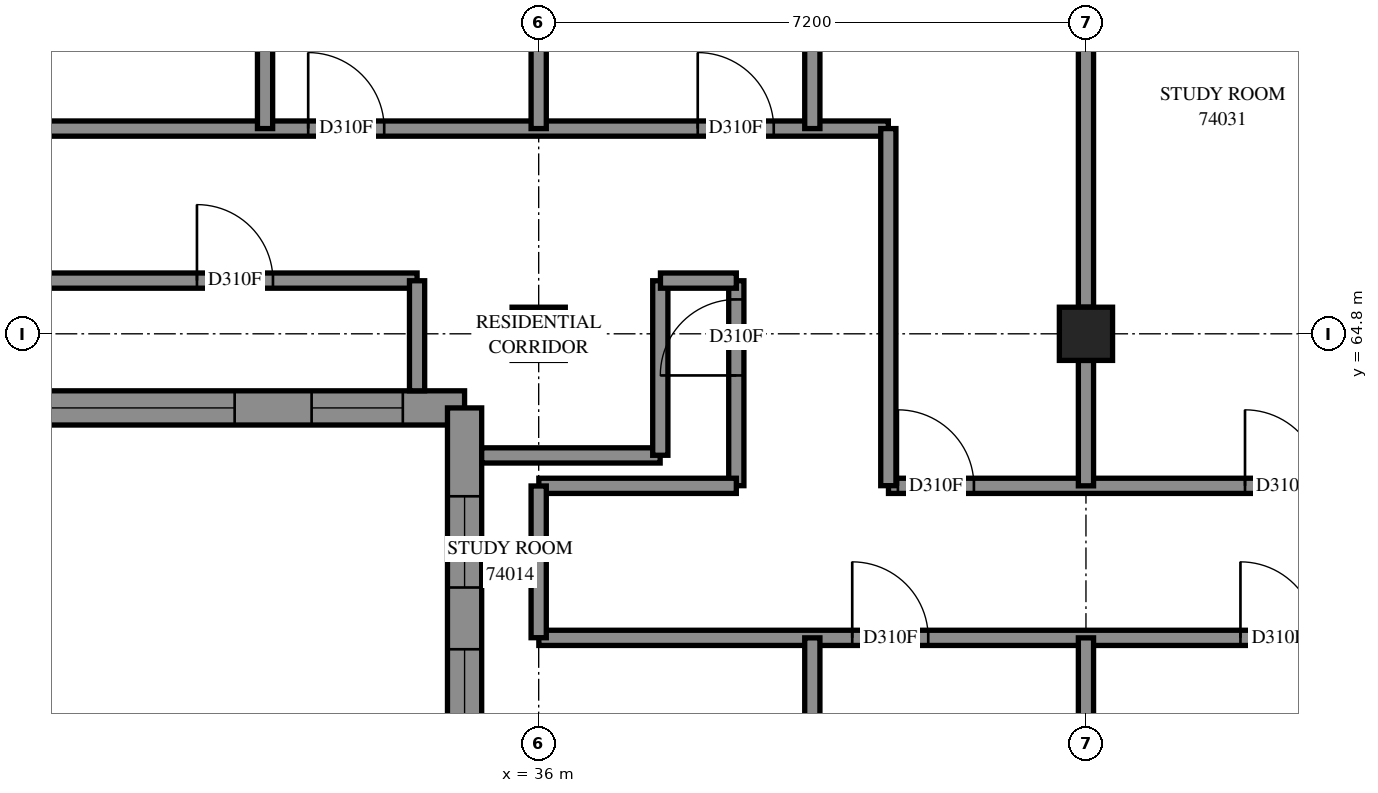
"""IFC4 building model, lengths in metres.
Left out: names, types, materials, properties, quantities, classifications, styles, units other than length and angle.
Written with IfcOpenShell. Run it as: python <this file> out.ifc"""

import sys

from ifc_helpers import new_model, si_unit, direction, frame, frame_2d, origin, origin_2d, place, context, subcontext, project, spatial, polyline, rectangle, outline, extrude, element, fill, save


model = new_model("IFC4")
c1 = context("Model", 3, precision=1e-05, world=origin(), true_north=direction((0.0, 1.0)))
c2 = subcontext(c1, "Body", "Model", "MODEL_VIEW")
j1 = project(units=[si_unit("LENGTHUNIT", "METRE"), si_unit("PLANEANGLEUNIT", "RADIAN")], contexts=[c1])
p1 = place(None, origin())
s1 = spatial("IfcSite", under=j1, at=p1, CompositionType="ELEMENT")
p2 = place(p1, origin())
s2 = spatial("IfcBuilding", under=s1, at=p2, CompositionType="ELEMENT")
p3 = place(p2, frame((0.0, 0.0, 271.0)))
s3 = spatial("IfcBuildingStorey", under=s2, at=p3, CompositionType="ELEMENT", Elevation=271.0)
for number, where, z_axis, x_axis in (
    (1, (36.0, 64.8, 0.0), (0.0, 0.0, 1.0), (1.0, 0.0, 0.0)),
    (2, (43.2, 64.8, 0.0), (0.0, 0.0, 1.0), (1.0, 0.0, 0.0)),
):
    element("IfcColumn", number, at=place(p3, frame(where, z_axis=z_axis, x_axis=x_axis)), inside=s3, PredefinedType="COLUMN", context=c2, shape_type="SweptSolid", body=[
        extrude(rectangle(XDim=0.7, YDim=0.7, at=origin_2d()), origin(), (0.0, 0.0, 1.0), 3.1),
    ])
p4 = place(p3, frame((26.683, 63.825, 0.0), z_axis=(0.0, 0.0, 1.0), x_axis=(1.0, 0.0, 0.0)))
e3 = element("IfcWall", 3, at=p4, inside=s3, PredefinedType="SOLIDWALL", context=c2, shape_type="SweptSolid", body=[
    extrude(outline(polyline([(-0.225, -0.225), (8.117, -0.225), (8.567, 0.225), (0.225, 0.225), (-0.225, -0.225)])), origin(), (0.0, 0.0, 1.0), 3.1),
])
p5 = place(p4, frame((2.517, 0.0, 0.45)))
e4 = element("IfcOpeningElement", 4, at=p5, cuts=e3, PredefinedType="OPENING", context=c2, shape_type="SweptSolid", body=[
    extrude(rectangle(XDim=2.8, YDim=2.55, at=frame_2d((1.4, 1.275))), frame((0.0, 0.235, 0.0), z_axis=(0.0, -1.0, 0.0), x_axis=(1.0, 0.0, 0.0)), (0.0, 0.0, 1.0), 0.47),
])
p6 = place(p4, frame((0.671, 0.0, 0.45)))
e5 = element("IfcOpeningElement", 5, at=p6, cuts=e3, PredefinedType="OPENING", context=c2, shape_type="SweptSolid", body=[
    extrude(rectangle(XDim=1.2, YDim=2.55, at=frame_2d((0.6, 1.275))), frame((0.0, 0.235, 0.0), z_axis=(0.0, -1.0, 0.0), x_axis=(1.0, 0.0, 0.0)), (0.0, 0.0, 1.0), 0.47),
])
p7 = place(p4, frame((6.33, 0.0, 0.45)))
e6 = element("IfcOpeningElement", 6, at=p7, cuts=e3, PredefinedType="OPENING", context=c2, shape_type="SweptSolid", body=[
    extrude(rectangle(XDim=1.2, YDim=2.55, at=frame_2d((0.6, 1.275))), frame((0.0, 0.235, 0.0), z_axis=(0.0, -1.0, 0.0), x_axis=(1.0, 0.0, 0.0)), (0.0, 0.0, 1.0), 0.47),
])
p8 = place(p3, frame((35.025, 63.825, 0.0), z_axis=(0.0, 0.0, 1.0), x_axis=(0.0, -1.0, 0.0)))
e7 = element("IfcWall", 7, at=p8, inside=s3, PredefinedType="SOLIDWALL", context=c2, shape_type="SweptSolid", body=[
    extrude(outline(polyline([(0.225, -0.225), (7.425, -0.225), (6.975, 0.225), (-0.225, 0.225), (0.225, -0.225)])), origin(), (0.0, 0.0, 1.0), 3.1),
])
p9 = place(p8, frame((3.175, 0.0, 0.45)))
e8 = element("IfcOpeningElement", 8, at=p9, cuts=e7, PredefinedType="OPENING", context=c2, shape_type="SweptSolid", body=[
    extrude(rectangle(XDim=2.8, YDim=2.55, at=frame_2d((1.4, 1.275))), frame((0.0, 0.235, 0.0), z_axis=(0.0, -1.0, 0.0), x_axis=(1.0, 0.0, 0.0)), (0.0, 0.0, 1.0), 0.47),
])
p10 = place(p8, frame((1.163, 0.0, 0.45)))
e9 = element("IfcOpeningElement", 9, at=p10, cuts=e7, PredefinedType="OPENING", context=c2, shape_type="SweptSolid", body=[
    extrude(rectangle(XDim=1.2, YDim=2.55, at=frame_2d((0.6, 1.275))), frame((0.0, 0.235, 0.0), z_axis=(0.0, -1.0, 0.0), x_axis=(1.0, 0.0, 0.0)), (0.0, 0.0, 1.0), 0.47),
])
p11 = place(p3, frame((36.002, 60.8, 0.0), z_axis=(0.0, 0.0, 1.0), x_axis=(1.0, 0.0, 0.0)))
e10 = element("IfcWall", 10, at=p11, inside=s3, PredefinedType="PARTITIONING", context=c2, shape_type="SweptSolid", body=[
    extrude(rectangle(XDim=16.998, YDim=0.2, at=frame_2d((8.499, 0.0))), origin(), (0.0, 0.0, 1.0), 3.1),
])
p12 = place(p11, frame((4.123, 0.0, 0.0)))
e11 = element("IfcOpeningElement", 11, at=p12, cuts=e10, PredefinedType="OPENING", context=c2, shape_type="SweptSolid", body=[
    extrude(rectangle(XDim=1.0, YDim=2.1, at=frame_2d((0.5, 1.05))), frame((0.0, 0.11, 0.0), z_axis=(0.0, -1.0, 0.0), x_axis=(1.0, 0.0, 0.0)), (0.0, 0.0, 1.0), 0.22),
])
p13 = place(p11, frame((9.23, 0.0, 0.0)))
e12 = element("IfcOpeningElement", 12, at=p13, cuts=e10, PredefinedType="OPENING", context=c2, shape_type="SweptSolid", body=[
    extrude(rectangle(XDim=1.0, YDim=2.1, at=frame_2d((0.5, 1.05))), frame((0.0, 0.11, 0.0), z_axis=(0.0, -1.0, 0.0), x_axis=(1.0, 0.0, 0.0)), (0.0, 0.0, 1.0), 0.22),
])
p14 = place(p11, frame((11.306, 0.0, 0.0)))
e13 = element("IfcOpeningElement", 13, at=p14, cuts=e10, PredefinedType="OPENING", context=c2, shape_type="SweptSolid", body=[
    extrude(rectangle(XDim=1.0, YDim=2.1, at=frame_2d((0.5, 1.05))), frame((0.0, 0.11, 0.0), z_axis=(0.0, -1.0, 0.0), x_axis=(1.0, 0.0, 0.0)), (0.0, 0.0, 1.0), 0.22),
])
p15 = place(p11, frame((15.872, 0.0, 0.0)))
e14 = element("IfcOpeningElement", 14, at=p15, cuts=e10, PredefinedType="OPENING", context=c2, shape_type="SweptSolid", body=[
    extrude(rectangle(XDim=1.0, YDim=2.1, at=frame_2d((0.5, 1.05))), frame((0.0, 0.11, 0.0), z_axis=(0.0, -1.0, 0.0), x_axis=(1.0, 0.0, 0.0)), (0.0, 0.0, 1.0), 0.22),
])
p16 = place(p3, frame((40.602, 62.8, 0.0), z_axis=(0.0, 0.0, 1.0), x_axis=(1.0, 0.0, 0.0)))
e15 = element("IfcWall", 15, at=p16, inside=s3, PredefinedType="PARTITIONING", context=c2, shape_type="SweptSolid", body=[
    extrude(rectangle(XDim=14.598, YDim=0.2, at=frame_2d((7.299, 0.0))), origin(), (0.0, 0.0, 1.0), 3.1),
])
p17 = place(p16, frame((0.124, 0.0, 0.0)))
e16 = element("IfcOpeningElement", 16, at=p17, cuts=e15, PredefinedType="OPENING", context=c2, shape_type="SweptSolid", body=[
    extrude(rectangle(XDim=1.0, YDim=2.1, at=frame_2d((0.5, 1.05))), frame((0.0, 0.11, 0.0), z_axis=(0.0, -1.0, 0.0), x_axis=(1.0, 0.0, 0.0)), (0.0, 0.0, 1.0), 0.22),
])
p18 = place(p16, frame((4.691, 0.0, 0.0)))
e17 = element("IfcOpeningElement", 17, at=p18, cuts=e15, PredefinedType="OPENING", context=c2, shape_type="SweptSolid", body=[
    extrude(rectangle(XDim=1.0, YDim=2.1, at=frame_2d((0.5, 1.05))), frame((0.0, 0.11, 0.0), z_axis=(0.0, -1.0, 0.0), x_axis=(1.0, 0.0, 0.0)), (0.0, 0.0, 1.0), 0.22),
])
p19 = place(p16, frame((6.766, 0.0, 0.0)))
e18 = element("IfcOpeningElement", 18, at=p19, cuts=e15, PredefinedType="OPENING", context=c2, shape_type="SweptSolid", body=[
    extrude(rectangle(XDim=1.0, YDim=2.1, at=frame_2d((0.5, 1.05))), frame((0.0, 0.11, 0.0), z_axis=(0.0, -1.0, 0.0), x_axis=(1.0, 0.0, 0.0)), (0.0, 0.0, 1.0), 0.22),
])
p20 = place(p16, frame((11.89, 0.0, 0.0)))
e19 = element("IfcOpeningElement", 19, at=p20, cuts=e15, PredefinedType="OPENING", context=c2, shape_type="SweptSolid", body=[
    extrude(rectangle(XDim=1.0, YDim=2.1, at=frame_2d((0.5, 1.05))), frame((0.0, 0.11, 0.0), z_axis=(0.0, -1.0, 0.0), x_axis=(1.0, 0.0, 0.0)), (0.0, 0.0, 1.0), 0.22),
])
p21 = place(p3, frame((28.802, 67.5, 0.0), z_axis=(0.0, 0.0, 1.0), x_axis=(1.0, 0.0, 0.0)))
e20 = element("IfcWall", 20, at=p21, inside=s3, PredefinedType="PARTITIONING", context=c2, shape_type="SweptSolid", body=[
    extrude(rectangle(XDim=11.798, YDim=0.2, at=frame_2d((5.899, 0.0))), origin(), (0.0, 0.0, 1.0), 3.1),
])
p22 = place(p21, frame((4.165, 0.0, 0.0)))
e21 = element("IfcOpeningElement", 21, at=p22, cuts=e20, PredefinedType="OPENING", context=c2, shape_type="SweptSolid", body=[
    extrude(rectangle(XDim=1.0, YDim=2.1, at=frame_2d((0.5, 1.05))), frame((0.0, 0.11, 0.0), z_axis=(0.0, -1.0, 0.0), x_axis=(1.0, 0.0, 0.0)), (0.0, 0.0, 1.0), 0.22),
])
p23 = place(p21, frame((9.29, 0.0, 0.0)))
e22 = element("IfcOpeningElement", 22, at=p23, cuts=e20, PredefinedType="OPENING", context=c2, shape_type="SweptSolid", body=[
    extrude(rectangle(XDim=1.0, YDim=2.1, at=frame_2d((0.5, 1.05))), frame((0.0, 0.11, 0.0), z_axis=(0.0, -1.0, 0.0), x_axis=(1.0, 0.0, 0.0)), (0.0, 0.0, 1.0), 0.22),
])
p24 = place(p3, frame((43.2, 65.15, 0.0), z_axis=(0.0, 0.0, 1.0), x_axis=(0.0, 1.0, 0.0)))
e23 = element("IfcWall", 23, at=p24, inside=s3, PredefinedType="PARTITIONING", context=c2, shape_type="SweptSolid", body=[
    extrude(rectangle(XDim=6.5, YDim=0.2, at=frame_2d((3.25, 0.0))), origin(), (0.0, 0.0, 1.0), 3.1),
])
p25 = place(p3, frame((28.802, 65.5, 0.0), z_axis=(0.0, 0.0, 1.0), x_axis=(1.0, 0.0, 0.0)))
e24 = element("IfcWall", 24, at=p25, inside=s3, PredefinedType="PARTITIONING", context=c2, shape_type="SweptSolid", body=[
    extrude(rectangle(XDim=5.598, YDim=0.2, at=frame_2d((2.799, 0.0))), origin(), (0.0, 0.0, 1.0), 3.1),
])
p26 = place(p25, frame((2.702, 0.0, 0.0)))
e25 = element("IfcOpeningElement", 25, at=p26, cuts=e24, PredefinedType="OPENING", context=c2, shape_type="SweptSolid", body=[
    extrude(rectangle(XDim=1.0, YDim=2.1, at=frame_2d((0.5, 1.05))), frame((0.0, 0.11, 0.0), z_axis=(0.0, -1.0, 0.0), x_axis=(1.0, 0.0, 0.0)), (0.0, 0.0, 1.0), 0.22),
])
p27 = place(p3, frame((32.4, 67.5, 0.0), z_axis=(0.0, 0.0, 1.0), x_axis=(0.0, 1.0, 0.0)))
e26 = element("IfcWall", 26, at=p27, inside=s3, PredefinedType="PARTITIONING", context=c2, shape_type="SweptSolid", body=[
    extrude(rectangle(XDim=5.543, YDim=0.2, at=frame_2d((2.772, 0.0))), origin(), (0.0, 0.0, 1.0), 3.1),
])
p28 = place(p3, frame((39.6, 67.5, 0.0), z_axis=(0.0, 0.0, 1.0), x_axis=(0.0, 1.0, 0.0)))
e27 = element("IfcWall", 27, at=p28, inside=s3, PredefinedType="PARTITIONING", context=c2, shape_type="SweptSolid", body=[
    extrude(rectangle(XDim=5.476, YDim=0.2, at=frame_2d((2.738, 0.0))), origin(), (0.0, 0.0, 1.0), 3.1),
])
p29 = place(p3, frame((40.6, 62.802, 0.0), z_axis=(0.0, 0.0, 1.0), x_axis=(0.0, 1.0, 0.0)))
e28 = element("IfcWall", 28, at=p29, inside=s3, PredefinedType="PARTITIONING", context=c2, shape_type="SweptSolid", body=[
    extrude(rectangle(XDim=4.698, YDim=0.2, at=frame_2d((2.349, 0.0))), origin(), (0.0, 0.0, 1.0), 3.1),
])
p30 = place(p3, frame((36.0, 67.5, 0.0), z_axis=(0.0, 0.0, 1.0), x_axis=(0.0, 1.0, 0.0)))
e29 = element("IfcWall", 29, at=p30, inside=s3, PredefinedType="PARTITIONING", context=c2, shape_type="SweptSolid", body=[
    extrude(rectangle(XDim=4.15, YDim=0.2, at=frame_2d((2.075, 0.0))), origin(), (0.0, 0.0, 1.0), 3.1),
])
p31 = place(p3, frame((39.6, 56.85, 0.0), z_axis=(0.0, 0.0, 1.0), x_axis=(0.0, 1.0, 0.0)))
e30 = element("IfcWall", 30, at=p31, inside=s3, PredefinedType="PARTITIONING", context=c2, shape_type="SweptSolid", body=[
    extrude(rectangle(XDim=3.95, YDim=0.2, at=frame_2d((1.975, 0.0))), origin(), (0.0, 0.0, 1.0), 3.1),
])
p32 = place(p3, frame((43.2, 57.95, 0.0), z_axis=(0.0, 0.0, 1.0), x_axis=(0.0, 1.0, 0.0)))
e31 = element("IfcWall", 31, at=p32, inside=s3, PredefinedType="PARTITIONING", context=c2, shape_type="SweptSolid", body=[
    extrude(rectangle(XDim=2.85, YDim=0.2, at=frame_2d((1.425, 0.0))), origin(), (0.0, 0.0, 1.0), 3.1),
])
p33 = place(p3, frame((38.6, 62.802, 0.0), z_axis=(0.0, 0.0, 1.0), x_axis=(0.0, 1.0, 0.0)))
e32 = element("IfcWall", 32, at=p33, inside=s3, PredefinedType="PARTITIONING", context=c2, shape_type="SweptSolid", body=[
    extrude(rectangle(XDim=2.696, YDim=0.2, at=frame_2d((1.348, 0.0))), origin(), (0.0, 0.0, 1.0), 3.1),
])
p34 = place(p33, frame((1.45, 0.0, 0.0)))
e33 = element("IfcOpeningElement", 33, at=p34, cuts=e32, PredefinedType="OPENING", context=c2, shape_type="SweptSolid", body=[
    extrude(rectangle(XDim=1.0, YDim=2.1, at=frame_2d((0.5, 1.05))), frame((0.0, 0.11, 0.0), z_axis=(0.0, -1.0, 0.0), x_axis=(1.0, 0.0, 0.0)), (0.0, 0.0, 1.0), 0.22),
])
p35 = place(p3, frame((36.002, 62.8, 0.0), z_axis=(0.0, 0.0, 1.0), x_axis=(1.0, 0.0, 0.0)))
e34 = element("IfcWall", 34, at=p35, inside=s3, PredefinedType="PARTITIONING", context=c2, shape_type="SweptSolid", body=[
    extrude(rectangle(XDim=2.598, YDim=0.2, at=frame_2d((1.299, 0.0))), origin(), (0.0, 0.0, 1.0), 3.1),
])
p36 = place(p3, frame((35.25, 63.2, 0.0), z_axis=(0.0, 0.0, 1.0), x_axis=(1.0, 0.0, 0.0)))
e35 = element("IfcWall", 35, at=p36, inside=s3, PredefinedType="PARTITIONING", context=c2, shape_type="SweptSolid", body=[
    extrude(rectangle(XDim=2.348, YDim=0.2, at=frame_2d((1.174, 0.0))), origin(), (0.0, 0.0, 1.0), 3.1),
])
p37 = place(p3, frame((37.6, 63.202, 0.0), z_axis=(0.0, 0.0, 1.0), x_axis=(0.0, 1.0, 0.0)))
e36 = element("IfcWall", 36, at=p37, inside=s3, PredefinedType="PARTITIONING", context=c2, shape_type="SweptSolid", body=[
    extrude(rectangle(XDim=2.296, YDim=0.2, at=frame_2d((1.148, 0.0))), origin(), (0.0, 0.0, 1.0), 3.1),
])
p38 = place(p3, frame((36.0, 60.802, 0.0), z_axis=(0.0, 0.0, 1.0), x_axis=(0.0, 1.0, 0.0)))
e37 = element("IfcWall", 37, at=p38, inside=s3, PredefinedType="PARTITIONING", context=c2, shape_type="SweptSolid", body=[
    extrude(rectangle(XDim=1.996, YDim=0.2, at=frame_2d((0.998, 0.0))), origin(), (0.0, 0.0, 1.0), 2.6),
])
p39 = place(p3, frame((43.2, 62.8, 0.0), z_axis=(0.0, 0.0, 1.0), x_axis=(0.0, 1.0, 0.0)))
e38 = element("IfcWall", 38, at=p39, inside=s3, PredefinedType="PARTITIONING", context=c2, shape_type="SweptSolid", body=[
    extrude(rectangle(XDim=1.65, YDim=0.2, at=frame_2d((0.825, 0.0))), origin(), (0.0, 0.0, 1.0), 3.1),
])
p40 = place(p3, frame((34.4, 64.05, 0.0), z_axis=(0.0, 0.0, 1.0), x_axis=(0.0, 1.0, 0.0)))
e39 = element("IfcWall", 39, at=p40, inside=s3, PredefinedType="PARTITIONING", context=c2, shape_type="SweptSolid", body=[
    extrude(rectangle(XDim=1.448, YDim=0.2, at=frame_2d((0.724, 0.0))), origin(), (0.0, 0.0, 1.0), 3.1),
])
p41 = place(p3, frame((37.602, 65.5, 0.0), z_axis=(0.0, 0.0, 1.0), x_axis=(1.0, 0.0, 0.0)))
e40 = element("IfcWall", 40, at=p41, inside=s3, PredefinedType="PARTITIONING", context=c2, shape_type="SweptSolid", body=[
    extrude(rectangle(XDim=0.998, YDim=0.2, at=frame_2d((0.499, 0.0))), origin(), (0.0, 0.0, 1.0), 3.1),
])
p42 = place(p5, origin())
e41 = element("IfcWindow", 41, at=p42, inside=s3, PartitioningType="SINGLE_PANEL", PredefinedType="WINDOW", context=c2, shape_type="SweptSolid", body=[
    extrude(rectangle(XDim=2.8, YDim=2.55, at=frame_2d((1.4, 1.275))), frame((0.0, 0.205, 0.0), z_axis=(0.0, -1.0, 0.0), x_axis=(1.0, 0.0, 0.0)), (0.0, 0.0, 1.0), 0.06),
])
fill(e4, e41)
p43 = place(p7, origin())
e42 = element("IfcWindow", 42, at=p43, inside=s3, PartitioningType="SINGLE_PANEL", PredefinedType="WINDOW", context=c2, shape_type="SweptSolid", body=[
    extrude(rectangle(XDim=1.2, YDim=2.55, at=frame_2d((0.6, 1.275))), frame((0.0, 0.205, 0.0), z_axis=(0.0, -1.0, 0.0), x_axis=(1.0, 0.0, 0.0)), (0.0, 0.0, 1.0), 0.06),
])
fill(e6, e42)
p44 = place(p9, origin())
e43 = element("IfcWindow", 43, at=p44, inside=s3, PartitioningType="SINGLE_PANEL", PredefinedType="WINDOW", context=c2, shape_type="SweptSolid", body=[
    extrude(rectangle(XDim=2.8, YDim=2.55, at=frame_2d((1.4, 1.275))), frame((0.0, 0.205, 0.0), z_axis=(0.0, -1.0, 0.0), x_axis=(1.0, 0.0, 0.0)), (0.0, 0.0, 1.0), 0.06),
])
fill(e8, e43)
p45 = place(p10, origin())
e44 = element("IfcWindow", 44, at=p45, inside=s3, PartitioningType="SINGLE_PANEL", PredefinedType="WINDOW", context=c2, shape_type="SweptSolid", body=[
    extrude(rectangle(XDim=1.2, YDim=2.55, at=frame_2d((0.6, 1.275))), frame((0.0, 0.205, 0.0), z_axis=(0.0, -1.0, 0.0), x_axis=(1.0, 0.0, 0.0)), (0.0, 0.0, 1.0), 0.06),
])
fill(e9, e44)
p46 = place(p34, origin())
e45 = element("IfcDoor", 45, at=p46, inside=s3, OperationType="SINGLE_SWING_LEFT", PredefinedType="DOOR", context=c2, shape_type="SweptSolid", body=[
    extrude(rectangle(XDim=1.0, YDim=2.1, at=frame_2d((0.5, 1.05))), frame((0.0, 0.025, 0.0), z_axis=(0.0, -1.0, 0.0), x_axis=(1.0, 0.0, 0.0)), (0.0, 0.0, 1.0), 0.05),
])
fill(e33, e45)
p47 = place(p12, origin())
e46 = element("IfcDoor", 46, at=p47, inside=s3, OperationType="SINGLE_SWING_RIGHT", PredefinedType="DOOR", context=c2, shape_type="SweptSolid", body=[
    extrude(rectangle(XDim=1.0, YDim=2.1, at=frame_2d((0.5, 1.05))), frame((0.0, 0.025, 0.0), z_axis=(0.0, -1.0, 0.0), x_axis=(1.0, 0.0, 0.0)), (0.0, 0.0, 1.0), 0.05),
])
fill(e11, e46)
p48 = place(p13, origin())
e47 = element("IfcDoor", 47, at=p48, inside=s3, OperationType="SINGLE_SWING_LEFT", PredefinedType="DOOR", context=c2, shape_type="SweptSolid", body=[
    extrude(rectangle(XDim=1.0, YDim=2.1, at=frame_2d((0.5, 1.05))), frame((0.0, 0.025, 0.0), z_axis=(0.0, -1.0, 0.0), x_axis=(1.0, 0.0, 0.0)), (0.0, 0.0, 1.0), 0.05),
])
fill(e12, e47)
p49 = place(p26, origin())
e48 = element("IfcDoor", 48, at=p49, inside=s3, OperationType="SINGLE_SWING_RIGHT", PredefinedType="DOOR", context=c2, shape_type="SweptSolid", body=[
    extrude(rectangle(XDim=1.0, YDim=2.1, at=frame_2d((0.5, 1.05))), frame((0.0, 0.025, 0.0), z_axis=(0.0, -1.0, 0.0), x_axis=(1.0, 0.0, 0.0)), (0.0, 0.0, 1.0), 0.05),
])
fill(e25, e48)
p50 = place(p22, origin())
e49 = element("IfcDoor", 49, at=p50, inside=s3, OperationType="SINGLE_SWING_LEFT", PredefinedType="DOOR", context=c2, shape_type="SweptSolid", body=[
    extrude(rectangle(XDim=1.0, YDim=2.1, at=frame_2d((0.5, 1.05))), frame((0.0, 0.025, 0.0), z_axis=(0.0, -1.0, 0.0), x_axis=(1.0, 0.0, 0.0)), (0.0, 0.0, 1.0), 0.05),
])
fill(e21, e49)
p51 = place(p23, origin())
e50 = element("IfcDoor", 50, at=p51, inside=s3, OperationType="SINGLE_SWING_RIGHT", PredefinedType="DOOR", context=c2, shape_type="SweptSolid", body=[
    extrude(rectangle(XDim=1.0, YDim=2.1, at=frame_2d((0.5, 1.05))), frame((0.0, 0.025, 0.0), z_axis=(0.0, -1.0, 0.0), x_axis=(1.0, 0.0, 0.0)), (0.0, 0.0, 1.0), 0.05),
])
fill(e22, e50)
p52 = place(p17, origin())
e51 = element("IfcDoor", 51, at=p52, inside=s3, OperationType="SINGLE_SWING_LEFT", PredefinedType="DOOR", context=c2, shape_type="SweptSolid", body=[
    extrude(rectangle(XDim=1.0, YDim=2.1, at=frame_2d((0.5, 1.05))), frame((0.0, 0.025, 0.0), z_axis=(0.0, -1.0, 0.0), x_axis=(1.0, 0.0, 0.0)), (0.0, 0.0, 1.0), 0.05),
])
fill(e16, e51)
p53 = place(p18, origin())
e52 = element("IfcDoor", 52, at=p53, inside=s3, OperationType="SINGLE_SWING_RIGHT", PredefinedType="DOOR", context=c2, shape_type="SweptSolid", body=[
    extrude(rectangle(XDim=1.0, YDim=2.1, at=frame_2d((0.5, 1.05))), frame((0.0, 0.025, 0.0), z_axis=(0.0, -1.0, 0.0), x_axis=(1.0, 0.0, 0.0)), (0.0, 0.0, 1.0), 0.05),
])
fill(e17, e52)
save(model, sys.argv[1])
